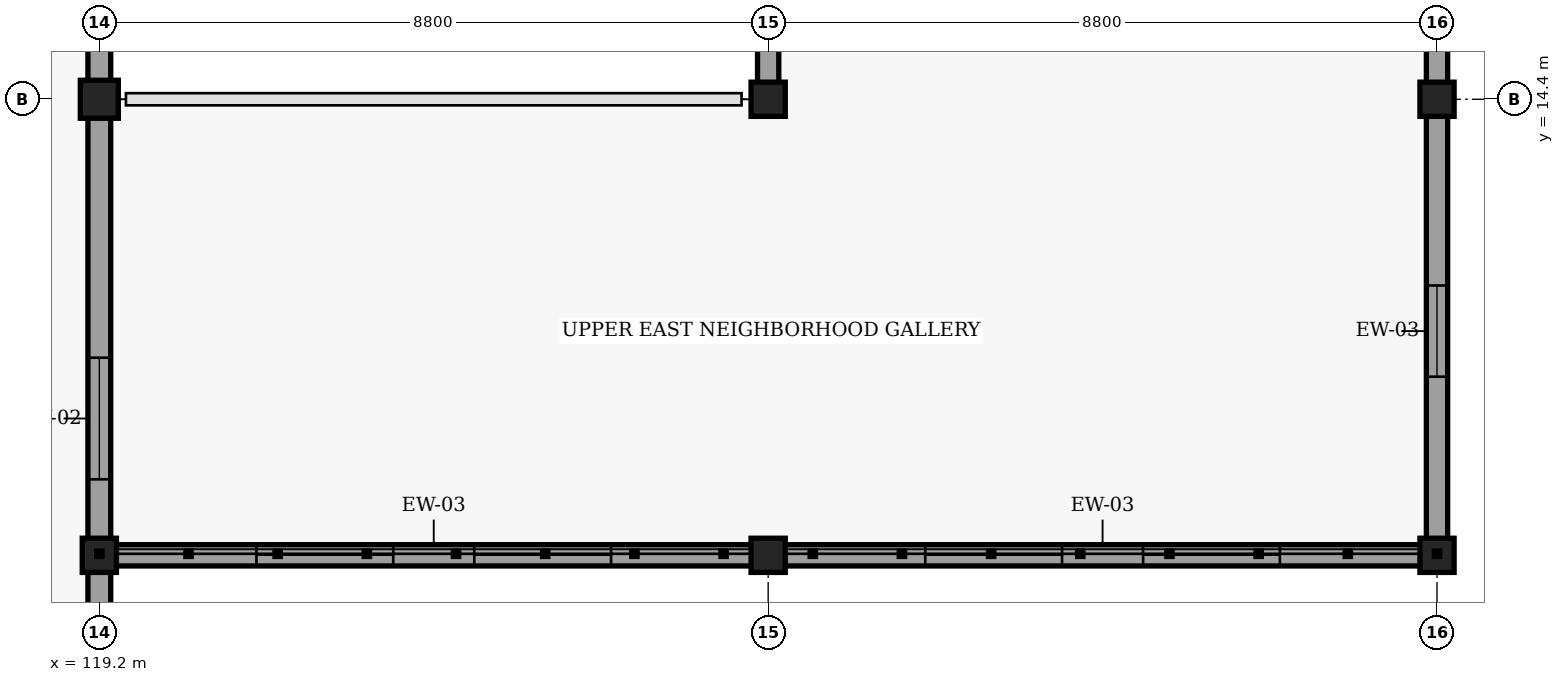
"""IFC4 building model, lengths in metres.
Left out: names, types, materials, properties, quantities, classifications, styles, units other than length and angle.
Written with IfcOpenShell. Run it as: python <this file> out.ifc"""

import sys

from ifc_helpers import new_model, si_unit, direction, frame, frame_2d, origin, origin_2d, place, context, subcontext, project, spatial, rectangle, extrude, element, fill, save


model = new_model("IFC4")
c1 = context("Model", 3, precision=1e-05, world=origin(), true_north=direction((0.0, 1.0)))
c2 = subcontext(c1, "Body", "Model", "MODEL_VIEW")
j1 = project(units=[si_unit("LENGTHUNIT", "METRE"), si_unit("PLANEANGLEUNIT", "RADIAN")], contexts=[c1])
p1 = place(None, origin())
s1 = spatial("IfcSite", under=j1, at=p1, CompositionType="ELEMENT")
p2 = place(p1, origin())
s2 = spatial("IfcBuilding", under=s1, at=p2, CompositionType="ELEMENT")
p3 = place(p2, frame((0.0, 0.0, 4.8)))
s3 = spatial("IfcBuildingStorey", under=s2, at=p3, CompositionType="ELEMENT", Elevation=4.8)
p4 = place(p3, frame((119.2, 14.4, 0.0), z_axis=(0.0, 0.0, 1.0), x_axis=(1.0, 0.0, 0.0)))
e1 = element("IfcColumn", 1, at=p4, inside=s3, PredefinedType="COLUMN", context=c2, shape_type="SweptSolid", body=[
    extrude(rectangle(XDim=0.5, YDim=0.5, at=origin_2d()), origin(), (0.0, 0.0, 1.0), 4.2),
])
for number, where, z_axis, x_axis in (
    (2, (128.0, 8.4, 0.0), (0.0, 0.0, 1.0), (1.0, 0.0, 0.0)),
    (3, (128.0, 14.4, 0.0), (0.0, 0.0, 1.0), (1.0, 0.0, 0.0)),
    (4, (136.8, 8.4, 0.0), (0.0, 0.0, 1.0), (1.0, 0.0, 0.0)),
    (5, (136.8, 14.4, 0.0), (0.0, 0.0, 1.0), (1.0, 0.0, 0.0)),
    (6, (119.2, 8.4, 0.0), (0.0, 0.0, 1.0), (1.0, 0.0, 0.0)),
):
    element("IfcColumn", number, at=place(p3, frame(where, z_axis=z_axis, x_axis=x_axis)), inside=s3, PredefinedType="COLUMN", context=c2, shape_type="SweptSolid", body=[
        extrude(rectangle(XDim=0.45, YDim=0.45, at=origin_2d()), origin(), (0.0, 0.0, 1.0), 4.2),
    ])
p5 = place(p3, frame((119.2, 6.1, 0.0), z_axis=(0.0, 0.0, 1.0), x_axis=(0.0, 1.0, 0.0)))
e7 = element("IfcWall", 7, at=p5, inside=s3, PredefinedType="SOLIDWALL", context=c2, shape_type="SweptSolid", body=[
    extrude(rectangle(XDim=8.2, YDim=0.3, at=frame_2d((4.1, 0.0))), origin(), (0.0, 0.0, 1.0), 3.495),
])
p6 = place(p5, frame((3.3, 0.0, 0.9)))
e8 = element("IfcOpeningElement", 8, at=p6, cuts=e7, PredefinedType="OPENING", context=c2, shape_type="SweptSolid", body=[
    extrude(rectangle(XDim=1.6, YDim=2.1, at=frame_2d((0.8, 1.05))), frame((0.0, 0.16, 0.0), z_axis=(0.0, -1.0, 0.0), x_axis=(1.0, 0.0, 0.0)), (0.0, 0.0, 1.0), 0.32),
])
p7 = place(p3, frame((119.2, 14.5, 0.0), z_axis=(0.0, 0.0, 1.0), x_axis=(0.0, 1.0, 0.0)))
e9 = element("IfcWall", 9, at=p7, inside=s3, PredefinedType="SOLIDWALL", context=c2, shape_type="SweptSolid", body=[
    extrude(rectangle(XDim=8.2, YDim=0.3, at=frame_2d((4.1, 0.0))), origin(), (0.0, 0.0, 1.0), 3.495),
])
p8 = place(p7, frame((3.3, 0.0, 0.9)))
e10 = element("IfcOpeningElement", 10, at=p8, cuts=e9, PredefinedType="OPENING", context=c2, shape_type="SweptSolid", body=[
    extrude(rectangle(XDim=1.6, YDim=2.1, at=frame_2d((0.8, 1.05))), frame((0.0, 0.16, 0.0), z_axis=(0.0, -1.0, 0.0), x_axis=(1.0, 0.0, 0.0)), (0.0, 0.0, 1.0), 0.32),
])
p9 = place(p3, frame((119.3, 8.4, 0.0), z_axis=(0.0, 0.0, 1.0), x_axis=(1.0, 0.0, 0.0)))
e11 = element("IfcWall", 11, at=p9, inside=s3, PredefinedType="SOLIDWALL", context=c2, shape_type="SweptSolid", body=[
    extrude(rectangle(XDim=8.6, YDim=0.28, at=frame_2d((4.3, 0.0))), origin(), (0.0, 0.0, 1.0), 4.1),
])
p10 = place(p9, frame((1.967, 0.0, 0.9)))
e12 = element("IfcOpeningElement", 12, at=p10, cuts=e11, PredefinedType="OPENING", context=c2, shape_type="SweptSolid", body=[
    extrude(rectangle(XDim=1.8, YDim=1.8, at=frame_2d((0.9, 0.9))), frame((0.0, 0.15, 0.0), z_axis=(0.0, -1.0, 0.0), x_axis=(1.0, 0.0, 0.0)), (0.0, 0.0, 1.0), 0.3),
])
p11 = place(p9, frame((4.833, 0.0, 0.9)))
e13 = element("IfcOpeningElement", 13, at=p11, cuts=e11, PredefinedType="OPENING", context=c2, shape_type="SweptSolid", body=[
    extrude(rectangle(XDim=1.8, YDim=1.8, at=frame_2d((0.9, 0.9))), frame((0.0, 0.15, 0.0), z_axis=(0.0, -1.0, 0.0), x_axis=(1.0, 0.0, 0.0)), (0.0, 0.0, 1.0), 0.3),
])
p12 = place(p3, frame((128.1, 8.4, 0.0), z_axis=(0.0, 0.0, 1.0), x_axis=(1.0, 0.0, 0.0)))
e14 = element("IfcWall", 14, at=p12, inside=s3, PredefinedType="SOLIDWALL", context=c2, shape_type="SweptSolid", body=[
    extrude(rectangle(XDim=8.6, YDim=0.28, at=frame_2d((4.3, 0.0))), origin(), (0.0, 0.0, 1.0), 4.1),
])
p13 = place(p12, frame((1.967, 0.0, 0.9)))
e15 = element("IfcOpeningElement", 15, at=p13, cuts=e14, PredefinedType="OPENING", context=c2, shape_type="SweptSolid", body=[
    extrude(rectangle(XDim=1.8, YDim=1.8, at=frame_2d((0.9, 0.9))), frame((0.0, 0.15, 0.0), z_axis=(0.0, -1.0, 0.0), x_axis=(1.0, 0.0, 0.0)), (0.0, 0.0, 1.0), 0.3),
])
p14 = place(p12, frame((4.833, 0.0, 0.9)))
e16 = element("IfcOpeningElement", 16, at=p14, cuts=e14, PredefinedType="OPENING", context=c2, shape_type="SweptSolid", body=[
    extrude(rectangle(XDim=1.8, YDim=1.8, at=frame_2d((0.9, 0.9))), frame((0.0, 0.15, 0.0), z_axis=(0.0, -1.0, 0.0), x_axis=(1.0, 0.0, 0.0)), (0.0, 0.0, 1.0), 0.3),
])
p15 = place(p3, frame((128.0, 14.45, 0.0), z_axis=(0.0, 0.0, 1.0), x_axis=(0.0, 1.0, 0.0)))
e17 = element("IfcWall", 17, at=p15, inside=s3, PredefinedType="SOLIDWALL", context=c2, shape_type="SweptSolid", body=[
    extrude(rectangle(XDim=8.2, YDim=0.28, at=frame_2d((4.1, 0.0))), origin(), (0.0, 0.0, 1.0), 4.1),
])
p16 = place(p3, frame((136.8, 8.45, 0.0), z_axis=(0.0, 0.0, 1.0), x_axis=(0.0, 1.0, 0.0)))
e18 = element("IfcWall", 18, at=p16, inside=s3, PredefinedType="SOLIDWALL", context=c2, shape_type="SweptSolid", body=[
    extrude(rectangle(XDim=5.8, YDim=0.28, at=frame_2d((2.9, 0.0))), origin(), (0.0, 0.0, 1.0), 3.872),
])
p17 = place(p16, frame((2.3, 0.0, 0.9)))
e19 = element("IfcOpeningElement", 19, at=p17, cuts=e18, PredefinedType="OPENING", context=c2, shape_type="SweptSolid", body=[
    extrude(rectangle(XDim=1.2, YDim=1.8, at=frame_2d((0.6, 0.9))), frame((0.0, 0.15, 0.0), z_axis=(0.0, -1.0, 0.0), x_axis=(1.0, 0.0, 0.0)), (0.0, 0.0, 1.0), 0.3),
])
p18 = place(p3, frame((136.8, 14.45, 0.0), z_axis=(0.0, 0.0, 1.0), x_axis=(0.0, 1.0, 0.0)))
e20 = element("IfcWall", 20, at=p18, inside=s3, PredefinedType="SOLIDWALL", context=c2, shape_type="SweptSolid", body=[
    extrude(rectangle(XDim=8.2, YDim=0.28, at=frame_2d((4.1, 0.0))), origin(), (0.0, 0.0, 1.0), 3.872),
])
p19 = place(p6, origin())
e21 = element("IfcWindow", 21, at=p19, inside=s3, PartitioningType="SINGLE_PANEL", PredefinedType="WINDOW", context=c2, shape_type="SweptSolid", body=[
    extrude(rectangle(XDim=1.6, YDim=2.1, at=frame_2d((0.8, 1.05))), frame((0.0, 0.03, 0.0), z_axis=(0.0, -1.0, 0.0), x_axis=(1.0, 0.0, 0.0)), (0.0, 0.0, 1.0), 0.06),
])
fill(e8, e21)
p20 = place(p10, origin())
e22 = element("IfcWindow", 22, at=p20, inside=s3, PartitioningType="SINGLE_PANEL", PredefinedType="WINDOW", context=c2, shape_type="SweptSolid", body=[
    extrude(rectangle(XDim=1.8, YDim=1.8, at=frame_2d((0.9, 0.9))), frame((0.0, 0.03, 0.0), z_axis=(0.0, -1.0, 0.0), x_axis=(1.0, 0.0, 0.0)), (0.0, 0.0, 1.0), 0.06),
])
fill(e12, e22)
p21 = place(p11, origin())
e23 = element("IfcWindow", 23, at=p21, inside=s3, PartitioningType="SINGLE_PANEL", PredefinedType="WINDOW", context=c2, shape_type="SweptSolid", body=[
    extrude(rectangle(XDim=1.8, YDim=1.8, at=frame_2d((0.9, 0.9))), frame((0.0, 0.03, 0.0), z_axis=(0.0, -1.0, 0.0), x_axis=(1.0, 0.0, 0.0)), (0.0, 0.0, 1.0), 0.06),
])
fill(e13, e23)
p22 = place(p13, origin())
e24 = element("IfcWindow", 24, at=p22, inside=s3, PartitioningType="SINGLE_PANEL", PredefinedType="WINDOW", context=c2, shape_type="SweptSolid", body=[
    extrude(rectangle(XDim=1.8, YDim=1.8, at=frame_2d((0.9, 0.9))), frame((0.0, 0.03, 0.0), z_axis=(0.0, -1.0, 0.0), x_axis=(1.0, 0.0, 0.0)), (0.0, 0.0, 1.0), 0.06),
])
fill(e15, e24)
p23 = place(p14, origin())
e25 = element("IfcWindow", 25, at=p23, inside=s3, PartitioningType="SINGLE_PANEL", PredefinedType="WINDOW", context=c2, shape_type="SweptSolid", body=[
    extrude(rectangle(XDim=1.8, YDim=1.8, at=frame_2d((0.9, 0.9))), frame((0.0, 0.03, 0.0), z_axis=(0.0, -1.0, 0.0), x_axis=(1.0, 0.0, 0.0)), (0.0, 0.0, 1.0), 0.06),
])
fill(e16, e25)
p24 = place(p17, origin())
e26 = element("IfcWindow", 26, at=p24, inside=s3, PartitioningType="SINGLE_PANEL", PredefinedType="WINDOW", context=c2, shape_type="SweptSolid", body=[
    extrude(rectangle(XDim=1.2, YDim=1.8, at=frame_2d((0.6, 0.9))), frame((0.0, 0.03, 0.0), z_axis=(0.0, -1.0, 0.0), x_axis=(1.0, 0.0, 0.0)), (0.0, 0.0, 1.0), 0.06),
])
fill(e19, e26)
save(model, sys.argv[1])
